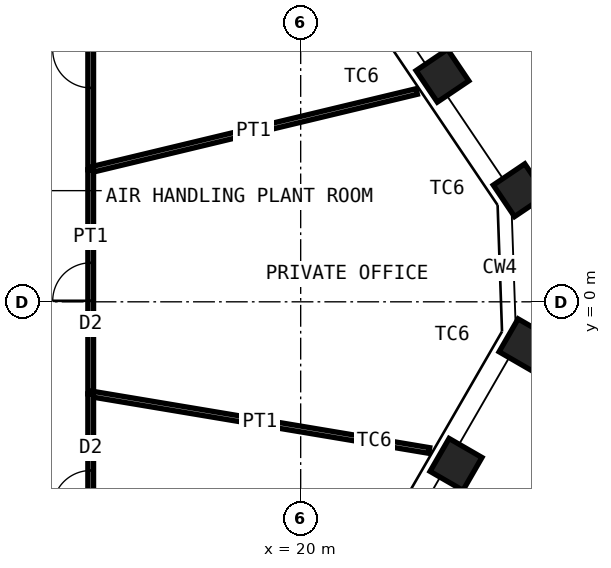
"""IFC4 building model, lengths in metres.
Left out: names, types, materials, properties, quantities, classifications, styles, units other than length and angle.
Written with IfcOpenShell. Run it as: python <this file> out.ifc"""

import sys

from ifc_helpers import new_model, si_unit, direction, frame, frame_2d, origin, origin_2d, place, context, subcontext, project, spatial, rectangle, hollow_rectangle, extrude, element, fill, save


model = new_model("IFC4")
c1 = context("Model", 3, precision=1e-05, world=origin(), true_north=direction((0.0, 1.0)))
c2 = subcontext(c1, "Body", "Model", "MODEL_VIEW")
j1 = project(units=[si_unit("LENGTHUNIT", "METRE"), si_unit("PLANEANGLEUNIT", "RADIAN")], contexts=[c1])
p1 = place(None, origin())
s1 = spatial("IfcSite", under=j1, at=p1, CompositionType="ELEMENT")
p2 = place(p1, origin())
s2 = spatial("IfcBuilding", under=s1, at=p2, CompositionType="ELEMENT")
p3 = place(p2, frame((0.0, 0.0, 230.8)))
s3 = spatial("IfcBuildingStorey", under=s2, at=p3, CompositionType="ELEMENT", Elevation=230.8)
for number, where, z_axis, x_axis in (
    (1, (23.731, 5.948, 0.0), (0.0, 0.0, 1.0), (-0.559, 0.829, 0.0)),
    (2, (25.762, 2.936, 0.0), (0.0, 0.0, 1.0), (-0.559, 0.829, 0.0)),
    (3, (25.905, -1.132, 0.0), (0.0, 0.0, 1.0), (0.5, 0.866, 0.0)),
    (4, (24.088, -4.279, 0.0), (0.0, 0.0, 1.0), (0.5, 0.866, 0.0)),
):
    element("IfcColumn", number, at=place(p3, frame(where, z_axis=z_axis, x_axis=x_axis)), inside=s3, PredefinedType="COLUMN", context=c2, shape_type="SweptSolid", body=[
        extrude(hollow_rectangle(XDim=1.0, YDim=1.0, WallThickness=0.06, at=origin_2d()), origin(), (0.0, 0.0, 1.0), 4.2),
    ])
p4 = place(p3, frame((14.475, 8.783, 0.0), z_axis=(0.0, 0.0, 1.0), x_axis=(0.0, -1.0, 0.0)))
e5 = element("IfcWall", 5, at=p4, inside=s3, PredefinedType="PARTITIONING", context=c2, shape_type="SweptSolid", body=[
    extrude(rectangle(XDim=5.309, YDim=0.15, at=frame_2d((2.654, 0.0))), origin(), (0.0, 0.0, 1.0), 4.03),
])
p5 = place(p4, frame((2.154, 0.0, 0.0)))
e6 = element("IfcOpeningElement", 6, at=p5, cuts=e5, PredefinedType="OPENING", context=c2, shape_type="SweptSolid", body=[
    extrude(rectangle(XDim=1.0, YDim=2.4, at=frame_2d((0.5, 1.2))), frame((0.0, 0.085, 0.0), z_axis=(0.0, -1.0, 0.0), x_axis=(1.0, 0.0, 0.0)), (0.0, 0.0, 1.0), 0.17),
])
p6 = place(p3, frame((23.053, 5.534, 0.0), z_axis=(0.0, 0.0, 1.0), x_axis=(-0.972377252501, -0.233414821335, 0.0)))
e7 = element("IfcWall", 7, at=p6, inside=s3, PredefinedType="PARTITIONING", context=c2, shape_type="SweptSolid", body=[
    extrude(rectangle(XDim=8.822, YDim=0.15, at=frame_2d((4.411, 0.0))), origin(), (0.0, 0.0, 1.0), 3.43),
])
p7 = place(p3, frame((14.475, 3.475, 0.0), z_axis=(0.0, 0.0, 1.0), x_axis=(0.0, -1.0, 0.0)))
e8 = element("IfcWall", 8, at=p7, inside=s3, PredefinedType="PARTITIONING", context=c2, shape_type="SweptSolid", body=[
    extrude(rectangle(XDim=5.896, YDim=0.15, at=frame_2d((2.948, 0.0))), origin(), (0.0, 0.0, 1.0), 4.03),
])
p8 = place(p7, frame((2.448, 0.0, 0.0)))
e9 = element("IfcOpeningElement", 9, at=p8, cuts=e8, PredefinedType="OPENING", context=c2, shape_type="SweptSolid", body=[
    extrude(rectangle(XDim=1.0, YDim=2.4, at=frame_2d((0.5, 1.2))), frame((0.0, 0.085, 0.0), z_axis=(0.0, -1.0, 0.0), x_axis=(1.0, 0.0, 0.0)), (0.0, 0.0, 1.0), 0.17),
])
p9 = place(p3, frame((23.383, -3.912, 0.0), z_axis=(0.0, 0.0, 1.0), x_axis=(-0.986293651891, 0.164999491631, 0.0)))
e10 = element("IfcWall", 10, at=p9, inside=s3, PredefinedType="PARTITIONING", context=c2, shape_type="SweptSolid", body=[
    extrude(rectangle(XDim=9.032, YDim=0.15, at=frame_2d((4.516, 0.0))), origin(), (0.0, 0.0, 1.0), 3.43),
])
p10 = place(p3, frame((14.475, -2.422, 0.0), z_axis=(0.0, 0.0, 1.0), x_axis=(0.0, -1.0, 0.0)))
e11 = element("IfcWall", 11, at=p10, inside=s3, PredefinedType="PARTITIONING", context=c2, shape_type="SweptSolid", body=[
    extrude(rectangle(XDim=5.033, YDim=0.15, at=frame_2d((2.517, 0.0))), origin(), (0.0, 0.0, 1.0), 4.03),
])
p11 = place(p10, frame((2.017, 0.0, 0.0)))
e12 = element("IfcOpeningElement", 12, at=p11, cuts=e11, PredefinedType="OPENING", context=c2, shape_type="SweptSolid", body=[
    extrude(rectangle(XDim=1.0, YDim=2.4, at=frame_2d((0.5, 1.2))), frame((0.0, 0.085, 0.0), z_axis=(0.0, -1.0, 0.0), x_axis=(1.0, 0.0, 0.0)), (0.0, 0.0, 1.0), 0.17),
])
p12 = place(p5, origin())
e13 = element("IfcDoor", 13, at=p12, inside=s3, OperationType="SINGLE_SWING_LEFT", PredefinedType="DOOR", context=c2, shape_type="SweptSolid", body=[
    extrude(rectangle(XDim=1.0, YDim=2.4, at=frame_2d((0.5, 1.2))), frame((0.0, 0.025, 0.0), z_axis=(0.0, -1.0, 0.0), x_axis=(1.0, 0.0, 0.0)), (0.0, 0.0, 1.0), 0.05),
])
fill(e6, e13)
p13 = place(p8, origin())
e14 = element("IfcDoor", 14, at=p13, inside=s3, OperationType="SINGLE_SWING_RIGHT", PredefinedType="DOOR", context=c2, shape_type="SweptSolid", body=[
    extrude(rectangle(XDim=1.0, YDim=2.4, at=frame_2d((0.5, 1.2))), frame((0.0, 0.025, 0.0), z_axis=(0.0, -1.0, 0.0), x_axis=(1.0, 0.0, 0.0)), (0.0, 0.0, 1.0), 0.05),
])
fill(e9, e14)
p14 = place(p11, origin())
e15 = element("IfcDoor", 15, at=p14, inside=s3, OperationType="SINGLE_SWING_RIGHT", PredefinedType="DOOR", context=c2, shape_type="SweptSolid", body=[
    extrude(rectangle(XDim=1.0, YDim=2.4, at=frame_2d((0.5, 1.2))), frame((0.0, 0.025, 0.0), z_axis=(0.0, -1.0, 0.0), x_axis=(1.0, 0.0, 0.0)), (0.0, 0.0, 1.0), 0.05),
])
fill(e12, e15)
save(model, sys.argv[1])
